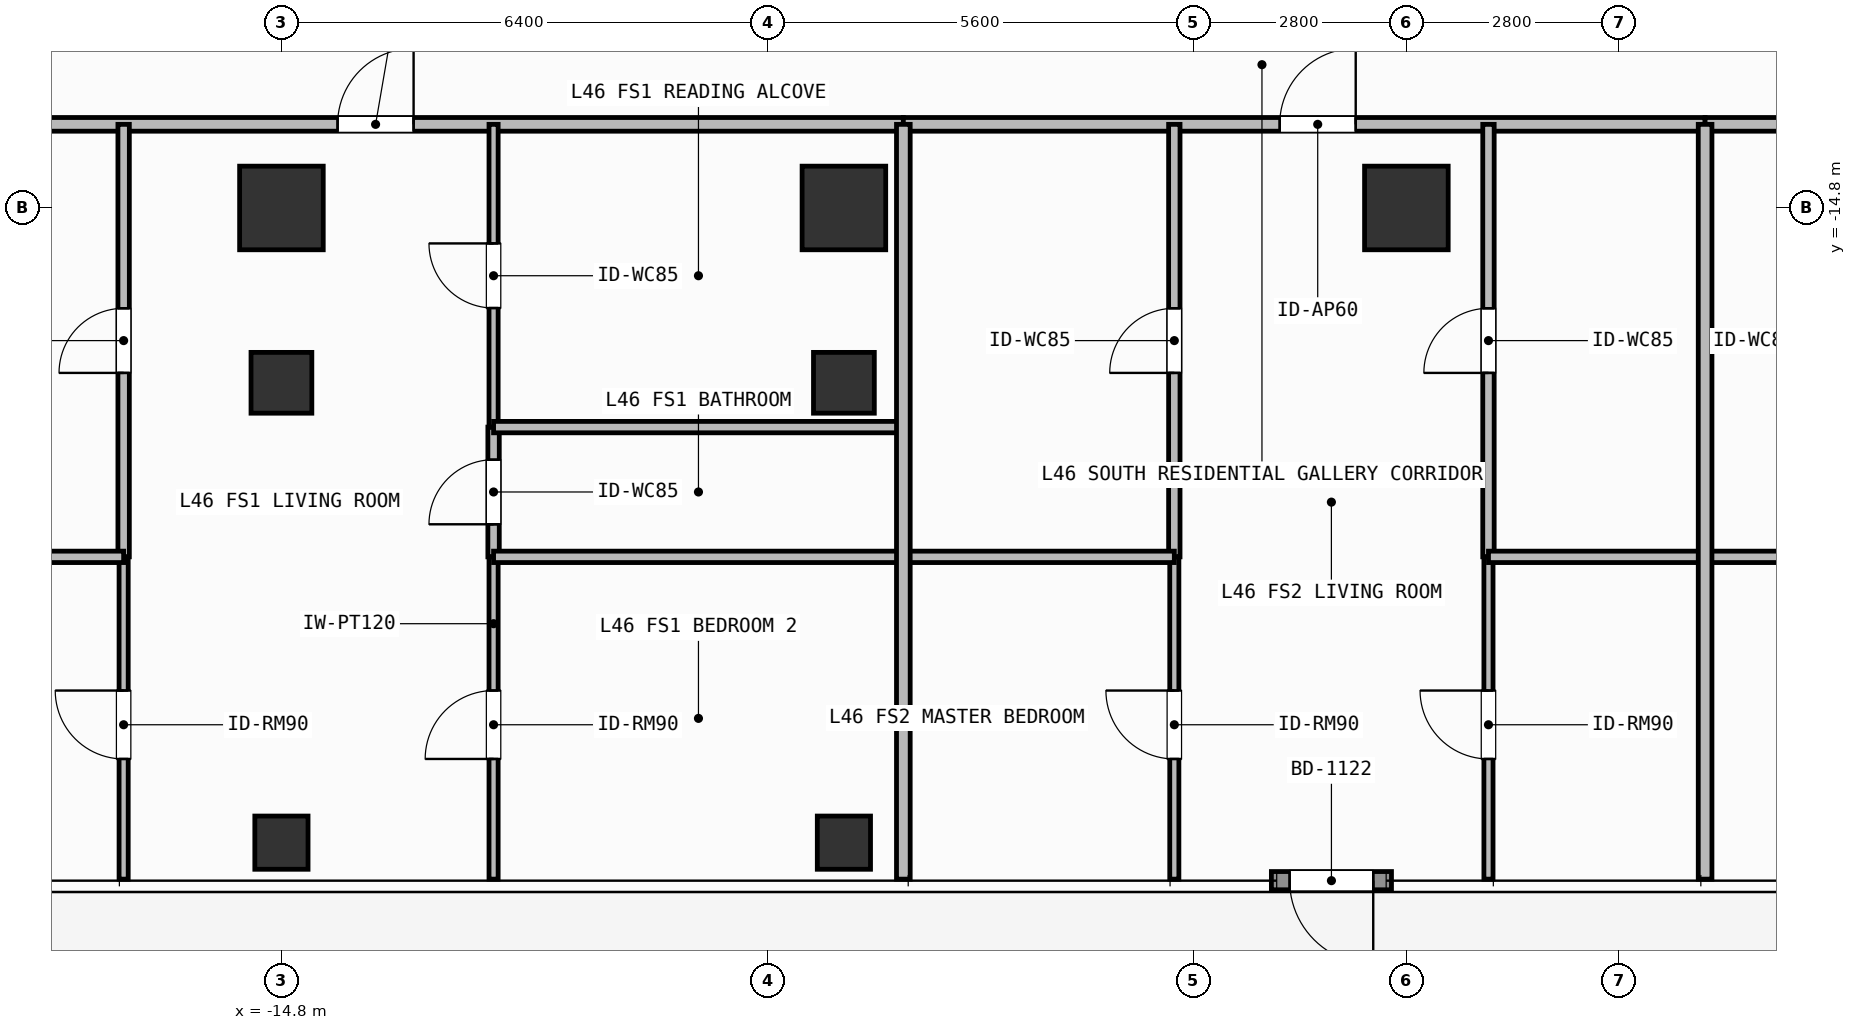
"""IFC4 building model, lengths in metres.
Left out: names, types, materials, properties, quantities, classifications, styles, units other than length and angle.
Written with IfcOpenShell. Run it as: python <this file> out.ifc"""

import sys

from ifc_helpers import new_model, si_unit, direction, frame, frame_2d, origin, origin_2d, place, context, subcontext, project, spatial, rectangle, hollow_rectangle, extrude, element, fill, save


model = new_model("IFC4")
c1 = context("Model", 3, precision=1e-05, world=origin(), true_north=direction((0.0, 1.0)))
c2 = subcontext(c1, "Body", "Model", "MODEL_VIEW")
j1 = project(units=[si_unit("LENGTHUNIT", "METRE"), si_unit("PLANEANGLEUNIT", "RADIAN")], contexts=[c1])
p1 = place(None, origin())
s1 = spatial("IfcSite", under=j1, at=p1, CompositionType="ELEMENT")
p2 = place(p1, origin())
s2 = spatial("IfcBuilding", under=s1, at=p2, CompositionType="ELEMENT")
p3 = place(p2, frame((0.0, 0.0, 187.5)))
s3 = spatial("IfcBuildingStorey", under=s2, at=p3, CompositionType="ELEMENT", Elevation=187.5)
for number, where, z_axis, x_axis in (
    (1, (-14.8, -14.8, 0.0), (0.0, 0.0, 1.0), (1.0, 0.0, 0.0)),
    (2, (-7.4, -14.8, 0.0), (0.0, 0.0, 1.0), (1.0, 0.0, 0.0)),
    (3, (0.0, -14.8, 0.0), (0.0, 0.0, 1.0), (1.0, 0.0, 0.0)),
):
    element("IfcColumn", number, at=place(p3, frame(where, z_axis=z_axis, x_axis=x_axis)), inside=s3, PredefinedType="COLUMN", context=c2, shape_type="SweptSolid", body=[
        extrude(rectangle(XDim=1.1, YDim=1.1, at=origin_2d()), origin(), (0.0, 0.0, 1.0), 3.9),
    ])
for number, where, z_axis, x_axis in (
    (4, (-14.8, -17.1, 0.0), (0.0, 0.0, 1.0), (1.0, 0.0, 0.0)),
    (5, (-7.4, -17.1, 0.0), (0.0, 0.0, 1.0), (1.0, 0.0, 0.0)),
):
    element("IfcColumn", number, at=place(p3, frame(where, z_axis=z_axis, x_axis=x_axis)), inside=s3, PredefinedType="COLUMN", context=c2, shape_type="SweptSolid", body=[
        extrude(hollow_rectangle(XDim=0.8, YDim=0.8, WallThickness=0.036, at=origin_2d()), origin(), (0.0, 0.0, 1.0), 3.9),
    ])
for number, where, z_axis, x_axis in (
    (6, (-14.8, -23.15, 0.0), (0.0, 0.0, 1.0), (1.0, 0.0, 0.0)),
    (7, (-7.4, -23.15, 0.0), (0.0, 0.0, 1.0), (1.0, 0.0, 0.0)),
):
    element("IfcColumn", number, at=place(p3, frame(where, z_axis=z_axis, x_axis=x_axis)), inside=s3, PredefinedType="COLUMN", context=c2, shape_type="SweptSolid", body=[
        extrude(hollow_rectangle(XDim=0.7, YDim=0.7, WallThickness=0.032, at=origin_2d()), origin(), (0.0, 0.0, 1.0), 3.9),
    ])
p4 = place(p3, frame((-0.196, -23.65, 0.0), z_axis=(0.0, 0.0, 1.0), x_axis=(-1.0, 0.0, 0.0)))
e8 = element("IfcWall", 8, at=p4, inside=s3, PredefinedType="SOLIDWALL", context=c2, shape_type="SweptSolid", body=[
    extrude(rectangle(XDim=1.58, YDim=0.24, at=frame_2d((0.79, 0.0))), origin(), (0.0, 0.0, 1.0), 3.62),
])
p5 = place(p4, frame((0.24, 0.0, 0.0)))
e9 = element("IfcOpeningElement", 9, at=p5, cuts=e8, PredefinedType="OPENING", context=c2, shape_type="SweptSolid", body=[
    extrude(rectangle(XDim=1.1, YDim=2.2, at=frame_2d((0.55, 1.1))), frame((0.0, 0.13, 0.0), z_axis=(0.0, -1.0, 0.0), x_axis=(1.0, 0.0, 0.0)), (0.0, 0.0, 1.0), 0.26),
])
p6 = place(p3, frame((-22.12, -13.7, 0.0), z_axis=(0.0, 0.0, 1.0), x_axis=(1.0, 0.0, 0.0)))
e10 = element("IfcWall", 10, at=p6, inside=s3, PredefinedType="PARTITIONING", context=c2, shape_type="SweptSolid", body=[
    extrude(rectangle(XDim=15.502, YDim=0.18, at=frame_2d((7.751, 0.0))), origin(), (0.0, 0.0, 1.0), 3.62),
])
p7 = place(p6, frame((8.059, 0.0, 0.0)))
e11 = element("IfcOpeningElement", 11, at=p7, cuts=e10, PredefinedType="OPENING", context=c2, shape_type="SweptSolid", body=[
    extrude(rectangle(XDim=1.0, YDim=2.2, at=frame_2d((0.5, 1.1))), frame((0.0, 0.1, 0.0), z_axis=(0.0, -1.0, 0.0), x_axis=(1.0, 0.0, 0.0)), (0.0, 0.0, 1.0), 0.2),
])
p8 = place(p3, frame((-16.876, -19.39, 0.0), z_axis=(0.0, 0.0, 1.0), x_axis=(0.0, 1.0, 0.0)))
e12 = element("IfcWall", 12, at=p8, inside=s3, PredefinedType="PARTITIONING", context=c2, shape_type="SweptSolid", body=[
    extrude(rectangle(XDim=5.69, YDim=0.15, at=frame_2d((2.845, 0.0))), origin(), (0.0, 0.0, 1.0), 3.62),
])
p9 = place(p8, frame((2.42, 0.0, 0.0)))
e13 = element("IfcOpeningElement", 13, at=p9, cuts=e12, PredefinedType="OPENING", context=c2, shape_type="SweptSolid", body=[
    extrude(rectangle(XDim=0.85, YDim=2.1, at=frame_2d((0.425, 1.05))), frame((0.0, 0.085, 0.0), z_axis=(0.0, -1.0, 0.0), x_axis=(1.0, 0.0, 0.0)), (0.0, 0.0, 1.0), 0.17),
])
p10 = place(p3, frame((-16.876, -23.63, 0.0), z_axis=(0.0, 0.0, 1.0), x_axis=(0.0, 1.0, 0.0)))
e14 = element("IfcWall", 14, at=p10, inside=s3, PredefinedType="PARTITIONING", context=c2, shape_type="SweptSolid", body=[
    extrude(rectangle(XDim=4.24, YDim=0.12, at=frame_2d((2.12, 0.0))), origin(), (0.0, 0.0, 1.0), 3.62),
])
p11 = place(p10, frame((1.581, 0.0, 0.0)))
e15 = element("IfcOpeningElement", 15, at=p11, cuts=e14, PredefinedType="OPENING", context=c2, shape_type="SweptSolid", body=[
    extrude(rectangle(XDim=0.9, YDim=2.1, at=frame_2d((0.45, 1.05))), frame((0.0, 0.07, 0.0), z_axis=(0.0, -1.0, 0.0), x_axis=(1.0, 0.0, 0.0)), (0.0, 0.0, 1.0), 0.14),
])
p12 = place(p3, frame((-12.009, -19.39, 0.0), z_axis=(0.0, 0.0, 1.0), x_axis=(0.0, 1.0, 0.0)))
e16 = element("IfcWall", 16, at=p12, inside=s3, PredefinedType="PARTITIONING", context=c2, shape_type="SweptSolid", body=[
    extrude(rectangle(XDim=1.707, YDim=0.15, at=frame_2d((0.854, 0.0))), origin(), (0.0, 0.0, 1.0), 3.62),
])
p13 = place(p12, frame((0.428, 0.0, 0.0)))
e17 = element("IfcOpeningElement", 17, at=p13, cuts=e16, PredefinedType="OPENING", context=c2, shape_type="SweptSolid", body=[
    extrude(rectangle(XDim=0.85, YDim=2.1, at=frame_2d((0.425, 1.05))), frame((0.0, 0.085, 0.0), z_axis=(0.0, -1.0, 0.0), x_axis=(1.0, 0.0, 0.0)), (0.0, 0.0, 1.0), 0.17),
])
p14 = place(p3, frame((-12.009, -17.683, 0.0), z_axis=(0.0, 0.0, 1.0), x_axis=(0.0, 1.0, 0.0)))
e18 = element("IfcWall", 18, at=p14, inside=s3, PredefinedType="PARTITIONING", context=c2, shape_type="SweptSolid", body=[
    extrude(rectangle(XDim=3.983, YDim=0.12, at=frame_2d((1.992, 0.0))), origin(), (0.0, 0.0, 1.0), 3.62),
])
p15 = place(p14, frame((1.566, 0.0, 0.0)))
e19 = element("IfcOpeningElement", 19, at=p15, cuts=e18, PredefinedType="OPENING", context=c2, shape_type="SweptSolid", body=[
    extrude(rectangle(XDim=0.85, YDim=2.1, at=frame_2d((0.425, 1.05))), frame((0.0, 0.07, 0.0), z_axis=(0.0, -1.0, 0.0), x_axis=(1.0, 0.0, 0.0)), (0.0, 0.0, 1.0), 0.14),
])
p16 = place(p3, frame((-12.009, -23.63, 0.0), z_axis=(0.0, 0.0, 1.0), x_axis=(0.0, 1.0, 0.0)))
e20 = element("IfcWall", 20, at=p16, inside=s3, PredefinedType="PARTITIONING", context=c2, shape_type="SweptSolid", body=[
    extrude(rectangle(XDim=4.24, YDim=0.12, at=frame_2d((2.12, 0.0))), origin(), (0.0, 0.0, 1.0), 3.62),
])
p17 = place(p16, frame((1.581, 0.0, 0.0)))
e21 = element("IfcOpeningElement", 21, at=p17, cuts=e20, PredefinedType="OPENING", context=c2, shape_type="SweptSolid", body=[
    extrude(rectangle(XDim=0.9, YDim=2.1, at=frame_2d((0.45, 1.05))), frame((0.0, 0.07, 0.0), z_axis=(0.0, -1.0, 0.0), x_axis=(1.0, 0.0, 0.0)), (0.0, 0.0, 1.0), 0.14),
])
p18 = place(p3, frame((-6.618, -13.7, 0.0), z_axis=(0.0, 0.0, 1.0), x_axis=(1.0, 0.0, 0.0)))
e22 = element("IfcWall", 22, at=p18, inside=s3, PredefinedType="PARTITIONING", context=c2, shape_type="SweptSolid", body=[
    extrude(rectangle(XDim=10.548, YDim=0.18, at=frame_2d((5.274, 0.0))), origin(), (0.0, 0.0, 1.0), 3.62),
])
p19 = place(p18, frame((4.951, 0.0, 0.0)))
e23 = element("IfcOpeningElement", 23, at=p19, cuts=e22, PredefinedType="OPENING", context=c2, shape_type="SweptSolid", body=[
    extrude(rectangle(XDim=1.0, YDim=2.2, at=frame_2d((0.5, 1.1))), frame((0.0, 0.1, 0.0), z_axis=(0.0, -1.0, 0.0), x_axis=(1.0, 0.0, 0.0)), (0.0, 0.0, 1.0), 0.2),
])
p20 = place(p3, frame((-3.053, -19.39, 0.0), z_axis=(0.0, 0.0, 1.0), x_axis=(0.0, 1.0, 0.0)))
e24 = element("IfcWall", 24, at=p20, inside=s3, PredefinedType="PARTITIONING", context=c2, shape_type="SweptSolid", body=[
    extrude(rectangle(XDim=5.69, YDim=0.15, at=frame_2d((2.845, 0.0))), origin(), (0.0, 0.0, 1.0), 3.62),
])
p21 = place(p20, frame((2.42, 0.0, 0.0)))
e25 = element("IfcOpeningElement", 25, at=p21, cuts=e24, PredefinedType="OPENING", context=c2, shape_type="SweptSolid", body=[
    extrude(rectangle(XDim=0.85, YDim=2.1, at=frame_2d((0.425, 1.05))), frame((0.0, 0.085, 0.0), z_axis=(0.0, -1.0, 0.0), x_axis=(1.0, 0.0, 0.0)), (0.0, 0.0, 1.0), 0.17),
])
p22 = place(p3, frame((-3.053, -23.63, 0.0), z_axis=(0.0, 0.0, 1.0), x_axis=(0.0, 1.0, 0.0)))
e26 = element("IfcWall", 26, at=p22, inside=s3, PredefinedType="PARTITIONING", context=c2, shape_type="SweptSolid", body=[
    extrude(rectangle(XDim=4.24, YDim=0.12, at=frame_2d((2.12, 0.0))), origin(), (0.0, 0.0, 1.0), 3.62),
])
p23 = place(p22, frame((1.581, 0.0, 0.0)))
e27 = element("IfcOpeningElement", 27, at=p23, cuts=e26, PredefinedType="OPENING", context=c2, shape_type="SweptSolid", body=[
    extrude(rectangle(XDim=0.9, YDim=2.1, at=frame_2d((0.45, 1.05))), frame((0.0, 0.07, 0.0), z_axis=(0.0, -1.0, 0.0), x_axis=(1.0, 0.0, 0.0)), (0.0, 0.0, 1.0), 0.14),
])
p24 = place(p3, frame((1.08, -19.39, 0.0), z_axis=(0.0, 0.0, 1.0), x_axis=(0.0, 1.0, 0.0)))
e28 = element("IfcWall", 28, at=p24, inside=s3, PredefinedType="PARTITIONING", context=c2, shape_type="SweptSolid", body=[
    extrude(rectangle(XDim=5.69, YDim=0.15, at=frame_2d((2.845, 0.0))), origin(), (0.0, 0.0, 1.0), 3.62),
])
p25 = place(p24, frame((2.42, 0.0, 0.0)))
e29 = element("IfcOpeningElement", 29, at=p25, cuts=e28, PredefinedType="OPENING", context=c2, shape_type="SweptSolid", body=[
    extrude(rectangle(XDim=0.85, YDim=2.1, at=frame_2d((0.425, 1.05))), frame((0.0, 0.085, 0.0), z_axis=(0.0, -1.0, 0.0), x_axis=(1.0, 0.0, 0.0)), (0.0, 0.0, 1.0), 0.17),
])
p26 = place(p3, frame((1.08, -23.63, 0.0), z_axis=(0.0, 0.0, 1.0), x_axis=(0.0, 1.0, 0.0)))
e30 = element("IfcWall", 30, at=p26, inside=s3, PredefinedType="PARTITIONING", context=c2, shape_type="SweptSolid", body=[
    extrude(rectangle(XDim=4.24, YDim=0.12, at=frame_2d((2.12, 0.0))), origin(), (0.0, 0.0, 1.0), 3.62),
])
p27 = place(p26, frame((1.581, 0.0, 0.0)))
e31 = element("IfcOpeningElement", 31, at=p27, cuts=e30, PredefinedType="OPENING", context=c2, shape_type="SweptSolid", body=[
    extrude(rectangle(XDim=0.9, YDim=2.1, at=frame_2d((0.45, 1.05))), frame((0.0, 0.07, 0.0), z_axis=(0.0, -1.0, 0.0), x_axis=(1.0, 0.0, 0.0)), (0.0, 0.0, 1.0), 0.14),
])
p28 = place(p3, frame((3.93, -13.7, 0.0), z_axis=(0.0, 0.0, 1.0), x_axis=(1.0, 0.0, 0.0)))
e32 = element("IfcWall", 32, at=p28, inside=s3, PredefinedType="PARTITIONING", context=c2, shape_type="SweptSolid", body=[
    extrude(rectangle(XDim=14.39, YDim=0.18, at=frame_2d((7.195, 0.0))), origin(), (0.0, 0.0, 1.0), 3.62),
])
p29 = place(p28, frame((6.605, 0.0, 0.0)))
e33 = element("IfcOpeningElement", 33, at=p29, cuts=e32, PredefinedType="OPENING", context=c2, shape_type="SweptSolid", body=[
    extrude(rectangle(XDim=1.0, YDim=2.2, at=frame_2d((0.5, 1.1))), frame((0.0, 0.1, 0.0), z_axis=(0.0, -1.0, 0.0), x_axis=(1.0, 0.0, 0.0)), (0.0, 0.0, 1.0), 0.2),
])
p30 = place(p3, frame((-22.12, -19.39, 0.0), z_axis=(0.0, 0.0, 1.0), x_axis=(1.0, 0.0, 0.0)))
e34 = element("IfcWall", 34, at=p30, inside=s3, PredefinedType="PARTITIONING", context=c2, shape_type="SweptSolid", body=[
    extrude(rectangle(XDim=5.244, YDim=0.15, at=frame_2d((2.622, 0.0))), origin(), (0.0, 0.0, 1.0), 3.62),
])
for number, where, z_axis, x_axis in (
    (35, (-12.009, -17.683, 0.0), (0.0, 0.0, 1.0), (1.0, 0.0, 0.0)),
    (36, (-12.009, -19.39, 0.0), (0.0, 0.0, 1.0), (1.0, 0.0, 0.0)),
):
    element("IfcWall", number, at=place(p3, frame(where, z_axis=z_axis, x_axis=x_axis)), inside=s3, PredefinedType="PARTITIONING", context=c2, shape_type="SweptSolid", body=[
        extrude(rectangle(XDim=5.391, YDim=0.15, at=frame_2d((2.696, 0.0))), origin(), (0.0, 0.0, 1.0), 3.62),
    ])
p31 = place(p3, frame((-6.618, -19.39, 0.0), z_axis=(0.0, 0.0, 1.0), x_axis=(1.0, 0.0, 0.0)))
e37 = element("IfcWall", 37, at=p31, inside=s3, PredefinedType="PARTITIONING", context=c2, shape_type="SweptSolid", body=[
    extrude(rectangle(XDim=3.565, YDim=0.15, at=frame_2d((1.782, 0.0))), origin(), (0.0, 0.0, 1.0), 3.62),
])
p32 = place(p3, frame((1.08, -19.39, 0.0), z_axis=(0.0, 0.0, 1.0), x_axis=(1.0, 0.0, 0.0)))
e38 = element("IfcWall", 38, at=p32, inside=s3, PredefinedType="PARTITIONING", context=c2, shape_type="SweptSolid", body=[
    extrude(rectangle(XDim=2.85, YDim=0.15, at=frame_2d((1.425, 0.0))), origin(), (0.0, 0.0, 1.0), 3.62),
])
p33 = place(p3, frame((-6.618, -23.63, 0.0), z_axis=(0.0, 0.0, 1.0), x_axis=(0.0, 1.0, 0.0)))
e39 = element("IfcWall", 39, at=p33, inside=s3, PredefinedType="PARTITIONING", context=c2, shape_type="SweptSolid", body=[
    extrude(rectangle(XDim=9.93, YDim=0.18, at=frame_2d((4.965, 0.0))), origin(), (0.0, 0.0, 1.0), 3.62),
])
p34 = place(p3, frame((3.93, -19.39, 0.0), z_axis=(0.0, 0.0, 1.0), x_axis=(1.0, 0.0, 0.0)))
e40 = element("IfcWall", 40, at=p34, inside=s3, PredefinedType="PARTITIONING", context=c2, shape_type="SweptSolid", body=[
    extrude(rectangle(XDim=5.442, YDim=0.15, at=frame_2d((2.721, 0.0))), origin(), (0.0, 0.0, 1.0), 3.62),
])
p35 = place(p3, frame((3.93, -23.63, 0.0), z_axis=(0.0, 0.0, 1.0), x_axis=(0.0, 1.0, 0.0)))
e41 = element("IfcWall", 41, at=p35, inside=s3, PredefinedType="PARTITIONING", context=c2, shape_type="SweptSolid", body=[
    extrude(rectangle(XDim=9.93, YDim=0.18, at=frame_2d((4.965, 0.0))), origin(), (0.0, 0.0, 1.0), 3.62),
])
p36 = place(p5, origin())
e42 = element("IfcDoor", 42, at=p36, inside=s3, OperationType="SINGLE_SWING_LEFT", PredefinedType="DOOR", context=c2, shape_type="SweptSolid", body=[
    extrude(rectangle(XDim=1.1, YDim=2.2, at=frame_2d((0.55, 1.1))), frame((0.0, 0.025, 0.0), z_axis=(0.0, -1.0, 0.0), x_axis=(1.0, 0.0, 0.0)), (0.0, 0.0, 1.0), 0.05),
])
fill(e9, e42)
p37 = place(p7, origin())
e43 = element("IfcDoor", 43, at=p37, inside=s3, OperationType="SINGLE_SWING_RIGHT", PredefinedType="DOOR", context=c2, shape_type="SweptSolid", body=[
    extrude(rectangle(XDim=1.0, YDim=2.2, at=frame_2d((0.5, 1.1))), frame((0.0, 0.025, 0.0), z_axis=(0.0, -1.0, 0.0), x_axis=(1.0, 0.0, 0.0)), (0.0, 0.0, 1.0), 0.05),
])
fill(e11, e43)
p38 = place(p9, origin())
e44 = element("IfcDoor", 44, at=p38, inside=s3, OperationType="SINGLE_SWING_LEFT", PredefinedType="DOOR", context=c2, shape_type="SweptSolid", body=[
    extrude(rectangle(XDim=0.85, YDim=2.1, at=frame_2d((0.425, 1.05))), frame((0.0, 0.025, 0.0), z_axis=(0.0, -1.0, 0.0), x_axis=(1.0, 0.0, 0.0)), (0.0, 0.0, 1.0), 0.05),
])
fill(e13, e44)
p39 = place(p11, origin())
e45 = element("IfcDoor", 45, at=p39, inside=s3, OperationType="SINGLE_SWING_RIGHT", PredefinedType="DOOR", context=c2, shape_type="SweptSolid", body=[
    extrude(rectangle(XDim=0.9, YDim=2.1, at=frame_2d((0.45, 1.05))), frame((0.0, 0.025, 0.0), z_axis=(0.0, -1.0, 0.0), x_axis=(1.0, 0.0, 0.0)), (0.0, 0.0, 1.0), 0.05),
])
fill(e15, e45)
p40 = place(p13, origin())
e46 = element("IfcDoor", 46, at=p40, inside=s3, OperationType="SINGLE_SWING_LEFT", PredefinedType="DOOR", context=c2, shape_type="SweptSolid", body=[
    extrude(rectangle(XDim=0.85, YDim=2.1, at=frame_2d((0.425, 1.05))), frame((0.0, 0.025, 0.0), z_axis=(0.0, -1.0, 0.0), x_axis=(1.0, 0.0, 0.0)), (0.0, 0.0, 1.0), 0.05),
])
fill(e17, e46)
p41 = place(p15, origin())
e47 = element("IfcDoor", 47, at=p41, inside=s3, OperationType="SINGLE_SWING_RIGHT", PredefinedType="DOOR", context=c2, shape_type="SweptSolid", body=[
    extrude(rectangle(XDim=0.85, YDim=2.1, at=frame_2d((0.425, 1.05))), frame((0.0, 0.025, 0.0), z_axis=(0.0, -1.0, 0.0), x_axis=(1.0, 0.0, 0.0)), (0.0, 0.0, 1.0), 0.05),
])
fill(e19, e47)
p42 = place(p17, origin())
e48 = element("IfcDoor", 48, at=p42, inside=s3, OperationType="SINGLE_SWING_LEFT", PredefinedType="DOOR", context=c2, shape_type="SweptSolid", body=[
    extrude(rectangle(XDim=0.9, YDim=2.1, at=frame_2d((0.45, 1.05))), frame((0.0, 0.025, 0.0), z_axis=(0.0, -1.0, 0.0), x_axis=(1.0, 0.0, 0.0)), (0.0, 0.0, 1.0), 0.05),
])
fill(e21, e48)
p43 = place(p19, origin())
e49 = element("IfcDoor", 49, at=p43, inside=s3, OperationType="SINGLE_SWING_RIGHT", PredefinedType="DOOR", context=c2, shape_type="SweptSolid", body=[
    extrude(rectangle(XDim=1.0, YDim=2.2, at=frame_2d((0.5, 1.1))), frame((0.0, 0.025, 0.0), z_axis=(0.0, -1.0, 0.0), x_axis=(1.0, 0.0, 0.0)), (0.0, 0.0, 1.0), 0.05),
])
fill(e23, e49)
p44 = place(p21, origin())
e50 = element("IfcDoor", 50, at=p44, inside=s3, OperationType="SINGLE_SWING_LEFT", PredefinedType="DOOR", context=c2, shape_type="SweptSolid", body=[
    extrude(rectangle(XDim=0.85, YDim=2.1, at=frame_2d((0.425, 1.05))), frame((0.0, 0.025, 0.0), z_axis=(0.0, -1.0, 0.0), x_axis=(1.0, 0.0, 0.0)), (0.0, 0.0, 1.0), 0.05),
])
fill(e25, e50)
p45 = place(p23, origin())
e51 = element("IfcDoor", 51, at=p45, inside=s3, OperationType="SINGLE_SWING_RIGHT", PredefinedType="DOOR", context=c2, shape_type="SweptSolid", body=[
    extrude(rectangle(XDim=0.9, YDim=2.1, at=frame_2d((0.45, 1.05))), frame((0.0, 0.025, 0.0), z_axis=(0.0, -1.0, 0.0), x_axis=(1.0, 0.0, 0.0)), (0.0, 0.0, 1.0), 0.05),
])
fill(e27, e51)
p46 = place(p25, origin())
e52 = element("IfcDoor", 52, at=p46, inside=s3, OperationType="SINGLE_SWING_LEFT", PredefinedType="DOOR", context=c2, shape_type="SweptSolid", body=[
    extrude(rectangle(XDim=0.85, YDim=2.1, at=frame_2d((0.425, 1.05))), frame((0.0, 0.025, 0.0), z_axis=(0.0, -1.0, 0.0), x_axis=(1.0, 0.0, 0.0)), (0.0, 0.0, 1.0), 0.05),
])
fill(e29, e52)
p47 = place(p27, origin())
e53 = element("IfcDoor", 53, at=p47, inside=s3, OperationType="SINGLE_SWING_RIGHT", PredefinedType="DOOR", context=c2, shape_type="SweptSolid", body=[
    extrude(rectangle(XDim=0.9, YDim=2.1, at=frame_2d((0.45, 1.05))), frame((0.0, 0.025, 0.0), z_axis=(0.0, -1.0, 0.0), x_axis=(1.0, 0.0, 0.0)), (0.0, 0.0, 1.0), 0.05),
])
fill(e31, e53)
save(model, sys.argv[1])
